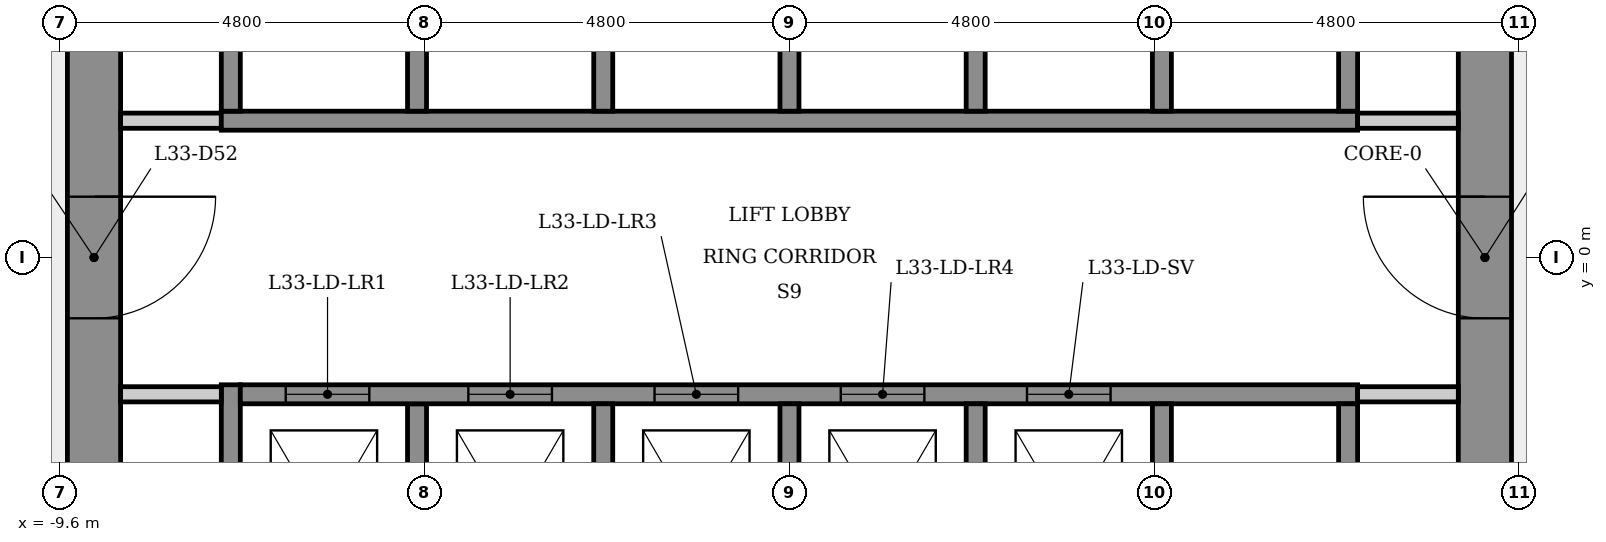
"""IFC4 building model, lengths in metres.
Left out: names, types, materials, properties, quantities, classifications, styles, units other than length and angle.
Written with IfcOpenShell. Run it as: python <this file> out.ifc"""

import sys

from ifc_helpers import new_model, si_unit, direction, frame, frame_2d, origin, place, context, subcontext, project, spatial, rectangle, extrude, element, fill, save


model = new_model("IFC4")
c1 = context("Model", 3, precision=1e-05, world=origin(), true_north=direction((0.0, 1.0)))
c2 = subcontext(c1, "Body", "Model", "MODEL_VIEW")
j1 = project(units=[si_unit("LENGTHUNIT", "METRE"), si_unit("PLANEANGLEUNIT", "RADIAN")], contexts=[c1])
p1 = place(None, origin())
s1 = spatial("IfcSite", under=j1, at=p1, CompositionType="ELEMENT")
p2 = place(p1, origin())
s2 = spatial("IfcBuilding", under=s1, at=p2, CompositionType="ELEMENT")
p3 = place(p2, frame((0.0, 0.0, 124.5)))
s3 = spatial("IfcBuildingStorey", under=s2, at=p3, CompositionType="ELEMENT", Elevation=124.5)
p4 = place(p3, frame((9.15, -5.485, 0.0), z_axis=(0.0, 0.0, 1.0), x_axis=(0.0, 1.0, 0.0)))
e1 = element("IfcWall", 1, at=p4, inside=s3, PredefinedType="SHEAR", context=c2, shape_type="SweptSolid", body=[
    extrude(rectangle(XDim=10.97, YDim=0.7, at=frame_2d((5.485, 0.0))), origin(), (0.0, 0.0, 1.0), 4.0),
])
p5 = place(p4, frame((4.685, 0.0, 0.0)))
e2 = element("IfcOpeningElement", 2, at=p5, cuts=e1, PredefinedType="OPENING", context=c2, shape_type="SweptSolid", body=[
    extrude(rectangle(XDim=1.6, YDim=2.1, at=frame_2d((0.8, 1.05))), frame((0.0, 0.36, 0.0), z_axis=(0.0, -1.0, 0.0), x_axis=(1.0, 0.0, 0.0)), (0.0, 0.0, 1.0), 0.72),
])
p6 = place(p3, frame((-9.15, 5.485, 0.0), z_axis=(0.0, 0.0, 1.0), x_axis=(0.0, -1.0, 0.0)))
e3 = element("IfcWall", 3, at=p6, inside=s3, PredefinedType="SHEAR", context=c2, shape_type="SweptSolid", body=[
    extrude(rectangle(XDim=10.97, YDim=0.7, at=frame_2d((5.485, 0.0))), origin(), (0.0, 0.0, 1.0), 4.0),
])
p7 = place(p6, frame((4.685, 0.0, 0.0)))
e4 = element("IfcOpeningElement", 4, at=p7, cuts=e3, PredefinedType="OPENING", context=c2, shape_type="SweptSolid", body=[
    extrude(rectangle(XDim=1.6, YDim=2.1, at=frame_2d((0.8, 1.05))), frame((0.0, 0.36, 0.0), z_axis=(0.0, -1.0, 0.0), x_axis=(1.0, 0.0, 0.0)), (0.0, 0.0, 1.0), 0.72),
])
p8 = place(p3, frame((-8.8, 1.8, 0.0), z_axis=(0.0, 0.0, 1.0), x_axis=(1.0, 0.0, 0.0)))
e5 = element("IfcWall", 5, at=p8, inside=s3, PredefinedType="PARTITIONING", context=c2, shape_type="SweptSolid", body=[
    extrude(rectangle(XDim=1.325, YDim=0.2, at=frame_2d((0.663, 0.0))), origin(), (0.0, 0.0, 1.0), 3.6),
])
p9 = place(p3, frame((-7.475, 1.8, 0.0), z_axis=(0.0, 0.0, 1.0), x_axis=(1.0, 0.0, 0.0)))
e6 = element("IfcWall", 6, at=p9, inside=s3, PredefinedType="SHEAR", context=c2, shape_type="SweptSolid", body=[
    extrude(rectangle(XDim=14.95, YDim=0.25, at=frame_2d((7.475, 0.0))), origin(), (0.0, 0.0, 1.0), 3.6),
])
p10 = place(p3, frame((-7.35, -5.846, 0.0), z_axis=(0.0, 0.0, 1.0), x_axis=(0.0, 1.0, 0.0)))
e7 = element("IfcWall", 7, at=p10, inside=s3, PredefinedType="SHEAR", context=c2, shape_type="SweptSolid", body=[
    extrude(rectangle(XDim=4.171, YDim=0.25, at=frame_2d((2.085, 0.0))), origin(), (0.0, 0.0, 1.0), 3.6),
])
p11 = place(p3, frame((-7.35, 1.925, 0.0), z_axis=(0.0, 0.0, 1.0), x_axis=(0.0, 1.0, 0.0)))
e8 = element("IfcWall", 8, at=p11, inside=s3, PredefinedType="SHEAR", context=c2, shape_type="SweptSolid", body=[
    extrude(rectangle(XDim=3.921, YDim=0.25, at=frame_2d((1.96, 0.0))), origin(), (0.0, 0.0, 1.0), 3.6),
])
p12 = place(p3, frame((-7.475, -1.8, 0.0), z_axis=(0.0, 0.0, 1.0), x_axis=(-1.0, 0.0, 0.0)))
e9 = element("IfcWall", 9, at=p12, inside=s3, PredefinedType="PARTITIONING", context=c2, shape_type="SweptSolid", body=[
    extrude(rectangle(XDim=1.325, YDim=0.2, at=frame_2d((0.663, 0.0))), origin(), (0.0, 0.0, 1.0), 3.6),
])
for number, where, z_axis, x_axis in (
    (10, (-4.9, -1.925, 0.0), (0.0, 0.0, 1.0), (0.0, -1.0, 0.0)),
    (11, (-4.9, 5.025, 0.0), (0.0, 0.0, 1.0), (0.0, -1.0, 0.0)),
):
    element("IfcWall", number, at=place(p3, frame(where, z_axis=z_axis, x_axis=x_axis)), inside=s3, PredefinedType="SHEAR", context=c2, shape_type="SweptSolid", body=[
        extrude(rectangle(XDim=3.1, YDim=0.25, at=frame_2d((1.55, 0.0))), origin(), (0.0, 0.0, 1.0), 4.0),
    ])
p13 = place(p3, frame((-7.225, -1.8, 0.0), z_axis=(0.0, 0.0, 1.0), x_axis=(1.0, 0.0, 0.0)))
e12 = element("IfcWall", 12, at=p13, inside=s3, PredefinedType="SHEAR", context=c2, shape_type="SweptSolid", body=[
    extrude(rectangle(XDim=14.7, YDim=0.25, at=frame_2d((7.35, 0.0))), origin(), (0.0, 0.0, 1.0), 3.6),
])
p14 = place(p13, frame((0.597, 0.0, 0.0)))
e13 = element("IfcOpeningElement", 13, at=p14, cuts=e12, PredefinedType="OPENING", context=c2, shape_type="SweptSolid", body=[
    extrude(rectangle(XDim=1.1, YDim=2.1, at=frame_2d((0.55, 1.05))), frame((0.0, 0.135, 0.0), z_axis=(0.0, -1.0, 0.0), x_axis=(1.0, 0.0, 0.0)), (0.0, 0.0, 1.0), 0.27),
])
p15 = place(p13, frame((3.0, 0.0, 0.0)))
e14 = element("IfcOpeningElement", 14, at=p15, cuts=e12, PredefinedType="OPENING", context=c2, shape_type="SweptSolid", body=[
    extrude(rectangle(XDim=1.1, YDim=2.1, at=frame_2d((0.55, 1.05))), frame((0.0, 0.135, 0.0), z_axis=(0.0, -1.0, 0.0), x_axis=(1.0, 0.0, 0.0)), (0.0, 0.0, 1.0), 0.27),
])
p16 = place(p13, frame((5.45, 0.0, 0.0)))
e15 = element("IfcOpeningElement", 15, at=p16, cuts=e12, PredefinedType="OPENING", context=c2, shape_type="SweptSolid", body=[
    extrude(rectangle(XDim=1.1, YDim=2.1, at=frame_2d((0.55, 1.05))), frame((0.0, 0.135, 0.0), z_axis=(0.0, -1.0, 0.0), x_axis=(1.0, 0.0, 0.0)), (0.0, 0.0, 1.0), 0.27),
])
p17 = place(p13, frame((7.9, 0.0, 0.0)))
e16 = element("IfcOpeningElement", 16, at=p17, cuts=e12, PredefinedType="OPENING", context=c2, shape_type="SweptSolid", body=[
    extrude(rectangle(XDim=1.1, YDim=2.1, at=frame_2d((0.55, 1.05))), frame((0.0, 0.135, 0.0), z_axis=(0.0, -1.0, 0.0), x_axis=(1.0, 0.0, 0.0)), (0.0, 0.0, 1.0), 0.27),
])
p18 = place(p13, frame((10.35, 0.0, 0.0)))
e17 = element("IfcOpeningElement", 17, at=p18, cuts=e12, PredefinedType="OPENING", context=c2, shape_type="SweptSolid", body=[
    extrude(rectangle(XDim=1.1, YDim=2.1, at=frame_2d((0.55, 1.05))), frame((0.0, 0.135, 0.0), z_axis=(0.0, -1.0, 0.0), x_axis=(1.0, 0.0, 0.0)), (0.0, 0.0, 1.0), 0.27),
])
for number, where, z_axis, x_axis in (
    (18, (-2.45, -1.925, 0.0), (0.0, 0.0, 1.0), (0.0, -1.0, 0.0)),
    (19, (-2.45, 5.025, 0.0), (0.0, 0.0, 1.0), (0.0, -1.0, 0.0)),
    (20, (0.0, -1.925, 0.0), (0.0, 0.0, 1.0), (0.0, -1.0, 0.0)),
    (21, (0.0, 5.025, 0.0), (0.0, 0.0, 1.0), (0.0, -1.0, 0.0)),
    (22, (2.45, -1.925, 0.0), (0.0, 0.0, 1.0), (0.0, -1.0, 0.0)),
    (23, (2.45, 5.025, 0.0), (0.0, 0.0, 1.0), (0.0, -1.0, 0.0)),
    (24, (4.9, -1.925, 0.0), (0.0, 0.0, 1.0), (0.0, -1.0, 0.0)),
    (25, (4.9, 5.025, 0.0), (0.0, 0.0, 1.0), (0.0, -1.0, 0.0)),
):
    element("IfcWall", number, at=place(p3, frame(where, z_axis=z_axis, x_axis=x_axis)), inside=s3, PredefinedType="SHEAR", context=c2, shape_type="SweptSolid", body=[
        extrude(rectangle(XDim=3.1, YDim=0.25, at=frame_2d((1.55, 0.0))), origin(), (0.0, 0.0, 1.0), 4.0),
    ])
p19 = place(p3, frame((7.475, 1.8, 0.0), z_axis=(0.0, 0.0, 1.0), x_axis=(1.0, 0.0, 0.0)))
e26 = element("IfcWall", 26, at=p19, inside=s3, PredefinedType="PARTITIONING", context=c2, shape_type="SweptSolid", body=[
    extrude(rectangle(XDim=1.325, YDim=0.2, at=frame_2d((0.663, 0.0))), origin(), (0.0, 0.0, 1.0), 3.6),
])
for number, where, z_axis, x_axis in (
    (27, (7.35, -1.925, 0.0), (0.0, 0.0, 1.0), (0.0, -1.0, 0.0)),
    (28, (7.35, 5.025, 0.0), (0.0, 0.0, 1.0), (0.0, -1.0, 0.0)),
):
    element("IfcWall", number, at=place(p3, frame(where, z_axis=z_axis, x_axis=x_axis)), inside=s3, PredefinedType="SHEAR", context=c2, shape_type="SweptSolid", body=[
        extrude(rectangle(XDim=3.1, YDim=0.25, at=frame_2d((1.55, 0.0))), origin(), (0.0, 0.0, 1.0), 4.0),
    ])
p20 = place(p3, frame((8.8, -1.8, 0.0), z_axis=(0.0, 0.0, 1.0), x_axis=(-1.0, 0.0, 0.0)))
e29 = element("IfcWall", 29, at=p20, inside=s3, PredefinedType="PARTITIONING", context=c2, shape_type="SweptSolid", body=[
    extrude(rectangle(XDim=1.325, YDim=0.2, at=frame_2d((0.663, 0.0))), origin(), (0.0, 0.0, 1.0), 3.6),
])
p21 = place(p14, origin())
e30 = element("IfcDoor", 30, at=p21, inside=s3, OperationType="SLIDING_TO_LEFT", PredefinedType="DOOR", context=c2, shape_type="SweptSolid", body=[
    extrude(rectangle(XDim=1.1, YDim=2.1, at=frame_2d((0.55, 1.05))), frame((0.0, 0.025, 0.0), z_axis=(0.0, -1.0, 0.0), x_axis=(1.0, 0.0, 0.0)), (0.0, 0.0, 1.0), 0.05),
])
fill(e13, e30)
p22 = place(p15, origin())
e31 = element("IfcDoor", 31, at=p22, inside=s3, OperationType="SLIDING_TO_LEFT", PredefinedType="DOOR", context=c2, shape_type="SweptSolid", body=[
    extrude(rectangle(XDim=1.1, YDim=2.1, at=frame_2d((0.55, 1.05))), frame((0.0, 0.025, 0.0), z_axis=(0.0, -1.0, 0.0), x_axis=(1.0, 0.0, 0.0)), (0.0, 0.0, 1.0), 0.05),
])
fill(e14, e31)
p23 = place(p16, origin())
e32 = element("IfcDoor", 32, at=p23, inside=s3, OperationType="SLIDING_TO_LEFT", PredefinedType="DOOR", context=c2, shape_type="SweptSolid", body=[
    extrude(rectangle(XDim=1.1, YDim=2.1, at=frame_2d((0.55, 1.05))), frame((0.0, 0.025, 0.0), z_axis=(0.0, -1.0, 0.0), x_axis=(1.0, 0.0, 0.0)), (0.0, 0.0, 1.0), 0.05),
])
fill(e15, e32)
p24 = place(p17, origin())
e33 = element("IfcDoor", 33, at=p24, inside=s3, OperationType="SLIDING_TO_LEFT", PredefinedType="DOOR", context=c2, shape_type="SweptSolid", body=[
    extrude(rectangle(XDim=1.1, YDim=2.1, at=frame_2d((0.55, 1.05))), frame((0.0, 0.025, 0.0), z_axis=(0.0, -1.0, 0.0), x_axis=(1.0, 0.0, 0.0)), (0.0, 0.0, 1.0), 0.05),
])
fill(e16, e33)
p25 = place(p18, origin())
e34 = element("IfcDoor", 34, at=p25, inside=s3, OperationType="SLIDING_TO_LEFT", PredefinedType="DOOR", context=c2, shape_type="SweptSolid", body=[
    extrude(rectangle(XDim=1.1, YDim=2.1, at=frame_2d((0.55, 1.05))), frame((0.0, 0.025, 0.0), z_axis=(0.0, -1.0, 0.0), x_axis=(1.0, 0.0, 0.0)), (0.0, 0.0, 1.0), 0.05),
])
fill(e17, e34)
p26 = place(p5, origin())
e35 = element("IfcDoor", 35, at=p26, inside=s3, OperationType="SINGLE_SWING_RIGHT", PredefinedType="DOOR", context=c2, shape_type="SweptSolid", body=[
    extrude(rectangle(XDim=1.6, YDim=2.1, at=frame_2d((0.8, 1.05))), frame((0.0, 0.025, 0.0), z_axis=(0.0, -1.0, 0.0), x_axis=(1.0, 0.0, 0.0)), (0.0, 0.0, 1.0), 0.05),
])
fill(e2, e35)
p27 = place(p7, origin())
e36 = element("IfcDoor", 36, at=p27, inside=s3, OperationType="SINGLE_SWING_LEFT", PredefinedType="DOOR", context=c2, shape_type="SweptSolid", body=[
    extrude(rectangle(XDim=1.6, YDim=2.1, at=frame_2d((0.8, 1.05))), frame((0.0, 0.025, 0.0), z_axis=(0.0, -1.0, 0.0), x_axis=(1.0, 0.0, 0.0)), (0.0, 0.0, 1.0), 0.05),
])
fill(e4, e36)
save(model, sys.argv[1])
